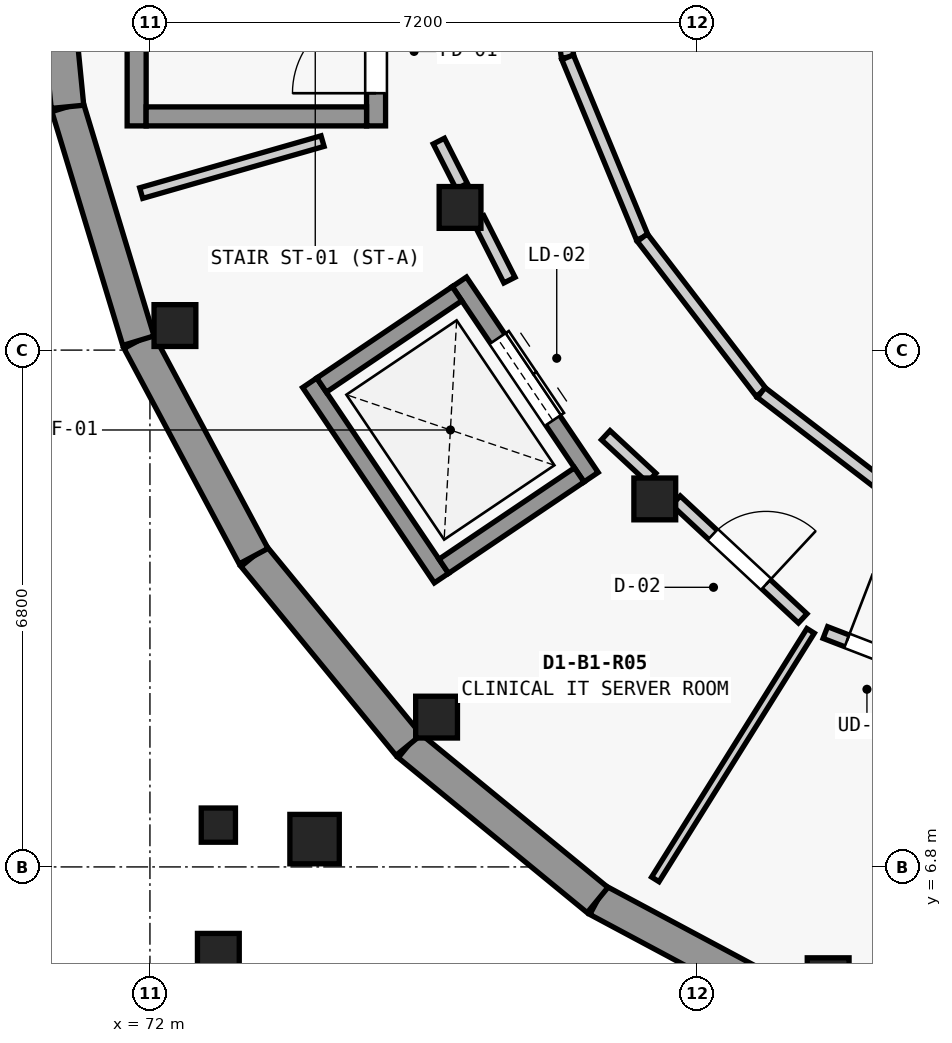
"""IFC4 building model, lengths in metres.
Left out: names, types, materials, properties, quantities, classifications, styles, units other than length and angle.
Written with IfcOpenShell. Run it as: python <this file> out.ifc"""

import sys

from ifc_helpers import new_model, si_unit, direction, frame, frame_2d, origin, origin_2d, place, context, subcontext, project, spatial, rectangle, extrude, element, fill, save


model = new_model("IFC4")
c1 = context("Model", 3, precision=1e-05, world=origin(), true_north=direction((0.0, 1.0)))
c2 = subcontext(c1, "Body", "Model", "MODEL_VIEW")
j1 = project(units=[si_unit("LENGTHUNIT", "METRE"), si_unit("PLANEANGLEUNIT", "RADIAN")], contexts=[c1])
p1 = place(None, origin())
s1 = spatial("IfcSite", under=j1, at=p1, CompositionType="ELEMENT")
p2 = place(p1, origin())
s2 = spatial("IfcBuilding", under=s1, at=p2, CompositionType="ELEMENT")
p3 = place(p2, frame((0.0, 0.0, -4.55)))
s3 = spatial("IfcBuildingStorey", under=s2, at=p3, CompositionType="ELEMENT", Elevation=-4.55)
for number, where, z_axis, x_axis in (
    (1, (72.329, 13.923, 0.0), (0.0, 0.0, 1.0), (1.0, 0.0, 0.0)),
    (2, (75.771, 8.771, 0.0), (0.0, 0.0, 1.0), (1.0, 0.0, 0.0)),
    (3, (80.923, 5.329, 0.0), (0.0, 0.0, 1.0), (1.0, 0.0, 0.0)),
    (4, (76.08, 15.477, 0.0), (0.0, 0.0, 1.0), (1.0, 0.0, 0.0)),
    (5, (78.642, 11.642, 0.0), (0.0, 0.0, 1.0), (1.0, 0.0, 0.0)),
    (6, (72.9, 5.65, 0.0), (0.0, 0.0, 1.0), (1.0, 0.0, 0.0)),
):
    element("IfcColumn", number, at=place(p3, frame(where, z_axis=z_axis, x_axis=x_axis)), inside=s3, PredefinedType="COLUMN", context=c2, shape_type="SweptSolid", body=[
        extrude(rectangle(XDim=0.55, YDim=0.55, at=origin_2d()), origin(), (0.0, 0.0, 1.0), 4.55),
    ])
p4 = place(p3, frame((74.166, 7.166, 0.0), z_axis=(0.0, 0.0, 1.0), x_axis=(1.0, 0.0, 0.0)))
e7 = element("IfcColumn", 7, at=p4, inside=s3, PredefinedType="COLUMN", context=c2, shape_type="SweptSolid", body=[
    extrude(rectangle(XDim=0.65, YDim=0.65, at=origin_2d()), origin(), (0.0, 0.0, 1.0), 4.55),
])
p5 = place(p3, frame((72.9, 7.35, 0.0), z_axis=(0.0, 0.0, 1.0), x_axis=(1.0, 0.0, 0.0)))
e8 = element("IfcColumn", 8, at=p5, inside=s3, PredefinedType="COLUMN", context=c2, shape_type="SweptSolid", body=[
    extrude(rectangle(XDim=0.45, YDim=0.45, at=origin_2d()), origin(), (0.0, 0.0, 1.0), 4.55),
])
for number, where, z_axis, x_axis in (
    (9, (80.724, 4.848, 0.0), (0.0, 0.0, 1.0), (-0.882, 0.472, 0.0)),
    (10, (77.889, 6.364, 0.0), (0.0, 0.0, 1.0), (-0.773, 0.634, 0.0)),
    (11, (75.403, 8.403, 0.0), (0.0, 0.0, 1.0), (-0.634, 0.773, 0.0)),
    (12, (73.364, 10.889, 0.0), (0.0, 0.0, 1.0), (-0.472, 0.882, 0.0)),
    (13, (71.848, 13.724, 0.0), (0.0, 0.0, 1.0), (-0.29, 0.957, 0.0)),
):
    element("IfcWall", number, at=place(p3, frame(where, z_axis=z_axis, x_axis=x_axis)), inside=s3, PredefinedType="USERDEFINED", context=c2, shape_type="SweptSolid", body=[
        extrude(rectangle(XDim=3.215, YDim=0.43, at=frame_2d((1.607, 0.0))), origin(), (0.0, 0.0, 1.0), 3.335),
    ])
p6 = place(p3, frame((70.915, 16.801, 0.0), z_axis=(0.0, 0.0, 1.0), x_axis=(-0.097977057849, 0.995188673637, 0.0)))
e14 = element("IfcWall", 14, at=p6, inside=s3, PredefinedType="USERDEFINED", context=c2, shape_type="SweptSolid", body=[
    extrude(rectangle(XDim=3.214, YDim=0.43, at=frame_2d((1.607, 0.0))), origin(), (0.0, 0.0, 1.0), 3.335),
])
p7 = place(p3, frame((74.975, 16.55, 0.0), z_axis=(0.0, 0.0, 1.0), x_axis=(0.0, 1.0, 0.0)))
e15 = element("IfcWall", 15, at=p7, inside=s3, PredefinedType="SHEAR", context=c2, shape_type="SweptSolid", body=[
    extrude(rectangle(XDim=6.9, YDim=0.25, at=frame_2d((3.45, 0.0))), origin(), (0.0, 0.0, 1.0), 4.135),
])
p8 = place(p7, frame((0.43, 0.0, 0.0)))
e16 = element("IfcOpeningElement", 16, at=p8, cuts=e15, PredefinedType="OPENING", context=c2, shape_type="SweptSolid", body=[
    extrude(rectangle(XDim=1.1, YDim=2.15, at=frame_2d((0.55, 1.075))), frame((0.0, 0.135, 0.0), z_axis=(0.0, -1.0, 0.0), x_axis=(1.0, 0.0, 0.0)), (0.0, 0.0, 1.0), 0.27),
])
p9 = place(p3, frame((71.825, 16.55, 0.0), z_axis=(0.0, 0.0, 1.0), x_axis=(0.0, 1.0, 0.0)))
e17 = element("IfcWall", 17, at=p9, inside=s3, PredefinedType="SHEAR", context=c2, shape_type="SweptSolid", body=[
    extrude(rectangle(XDim=6.9, YDim=0.25, at=frame_2d((3.45, 0.0))), origin(), (0.0, 0.0, 1.0), 4.135),
])
p10 = place(p3, frame((74.85, 16.675, 0.0), z_axis=(0.0, 0.0, 1.0), x_axis=(-1.0, 0.0, 0.0)))
e18 = element("IfcWall", 18, at=p10, inside=s3, PredefinedType="SHEAR", context=c2, shape_type="SweptSolid", body=[
    extrude(rectangle(XDim=2.9, YDim=0.25, at=frame_2d((1.45, 0.0))), origin(), (0.0, 0.0, 1.0), 4.135),
])
p11 = place(p3, frame((77.804, 11.928, 0.0), z_axis=(0.0, 0.0, 1.0), x_axis=(-0.559054792443, 0.829130712883, 0.0)))
e19 = element("IfcWall", 19, at=p11, inside=s3, PredefinedType="SHEAR", context=c2, shape_type="SweptSolid", body=[
    extrude(rectangle(XDim=3.1, YDim=0.225, at=frame_2d((1.55, 0.0))), origin(), (0.0, 0.0, 1.0), 4.135),
])
p12 = place(p11, frame((0.9, 0.0, 0.0)))
e20 = element("IfcOpeningElement", 20, at=p12, cuts=e19, PredefinedType="OPENING", context=c2, shape_type="SweptSolid", body=[
    extrude(rectangle(XDim=1.3, YDim=2.2, at=frame_2d((0.65, 1.1))), frame((0.0, 0.123, 0.0), z_axis=(0.0, -1.0, 0.0), x_axis=(1.0, 0.0, 0.0)), (0.0, 0.0, 1.0), 0.245),
])
p13 = place(p3, frame((75.835, 10.6, 0.0), z_axis=(0.0, 0.0, 1.0), x_axis=(-0.559091302934, 0.829106093925, 0.0)))
e21 = element("IfcWall", 21, at=p13, inside=s3, PredefinedType="SHEAR", context=c2, shape_type="SweptSolid", body=[
    extrude(rectangle(XDim=3.1, YDim=0.225, at=frame_2d((1.55, 0.0))), origin(), (0.0, 0.0, 1.0), 4.135),
])
p14 = place(p3, frame((77.648, 11.958, 0.0), z_axis=(0.0, 0.0, 1.0), x_axis=(-0.829050086962, -0.559174349652, 0.0)))
e22 = element("IfcWall", 22, at=p14, inside=s3, PredefinedType="SHEAR", context=c2, shape_type="SweptSolid", body=[
    extrude(rectangle(XDim=2.149, YDim=0.225, at=frame_2d((1.075, 0.0))), origin(), (0.0, 0.0, 1.0), 4.135),
])
p15 = place(p3, frame((76.04, 14.342, 0.0), z_axis=(0.0, 0.0, 1.0), x_axis=(-0.828997430928, -0.559252411274, 0.0)))
e23 = element("IfcWall", 23, at=p15, inside=s3, PredefinedType="SHEAR", context=c2, shape_type="SweptSolid", body=[
    extrude(rectangle(XDim=2.15, YDim=0.225, at=frame_2d((1.075, 0.0))), origin(), (0.0, 0.0, 1.0), 4.135),
])
p16 = place(p3, frame((77.16, 20.0, 0.0), z_axis=(0.0, 0.0, 1.0), x_axis=(0.130476636685, -0.991451384224, 0.0)))
e24 = element("IfcWall", 24, at=p16, inside=s3, PredefinedType="PARTITIONING", context=c2, shape_type="SweptSolid", body=[
    extrude(rectangle(XDim=2.569, YDim=0.165, at=frame_2d((1.285, 0.0))), origin(), (0.0, 0.0, 1.0), 2.76),
])
p17 = place(p3, frame((77.495, 17.453, 0.0), z_axis=(0.0, 0.0, 1.0), x_axis=(0.382704397106, -0.923870848353, 0.0)))
e25 = element("IfcWall", 25, at=p17, inside=s3, PredefinedType="PARTITIONING", context=c2, shape_type="SweptSolid", body=[
    extrude(rectangle(XDim=2.568, YDim=0.165, at=frame_2d((1.284, 0.0))), origin(), (0.0, 0.0, 1.0), 2.76),
])
for number, where, z_axis, x_axis in (
    (26, (78.478, 15.08, 0.0), (0.0, 0.0, 1.0), (0.609, -0.793, 0.0)),
    (27, (80.042, 13.042, 0.0), (0.0, 0.0, 1.0), (0.793, -0.609, 0.0)),
):
    element("IfcWall", number, at=place(p3, frame(where, z_axis=z_axis, x_axis=x_axis)), inside=s3, PredefinedType="PARTITIONING", context=c2, shape_type="SweptSolid", body=[
        extrude(rectangle(XDim=2.569, YDim=0.165, at=frame_2d((1.285, 0.0))), origin(), (0.0, 0.0, 1.0), 2.76),
    ])
p18 = place(p3, frame((74.271, 16.35, 0.0), z_axis=(0.0, 0.0, 1.0), x_axis=(-0.96127114667, -0.275604395065, 0.0)))
e28 = element("IfcWall", 28, at=p18, inside=s3, PredefinedType="PARTITIONING", context=c2, shape_type="SweptSolid", body=[
    extrude(rectangle(XDim=2.482, YDim=0.145, at=frame_2d((1.241, 0.0))), origin(), (0.0, 0.0, 1.0), 2.76),
])
p19 = place(p3, frame((80.692, 9.906, 0.0), z_axis=(0.0, 0.0, 1.0), x_axis=(-0.529850951132, -0.848090779094, 0.0)))
e29 = element("IfcWall", 29, at=p19, inside=s3, PredefinedType="PARTITIONING", context=c2, shape_type="SweptSolid", body=[
    extrude(rectangle(XDim=3.856, YDim=0.115, at=frame_2d((1.928, 0.0))), origin(), (0.0, 0.0, 1.0), 2.76),
])
p20 = place(p3, frame((75.801, 16.35, 0.0), z_axis=(0.0, 0.0, 1.0), x_axis=(0.453212137126, -0.891402691695, 0.0)))
e30 = element("IfcWall", 30, at=p20, inside=s3, PredefinedType="PARTITIONING", context=c2, shape_type="SweptSolid", body=[
    extrude(rectangle(XDim=0.666, YDim=0.165, at=frame_2d((0.333, 0.0))), origin(), (0.0, 0.0, 1.0), 2.76),
])
p21 = place(p3, frame((76.319, 15.331, 0.0), z_axis=(0.0, 0.0, 1.0), x_axis=(0.452366842615, -0.891831957099, 0.0)))
e31 = element("IfcWall", 31, at=p21, inside=s3, PredefinedType="PARTITIONING", context=c2, shape_type="SweptSolid", body=[
    extrude(rectangle(XDim=0.908, YDim=0.165, at=frame_2d((0.454, 0.0))), origin(), (0.0, 0.0, 1.0), 2.76),
])
p22 = place(p3, frame((77.997, 12.48, 0.0), z_axis=(0.0, 0.0, 1.0), x_axis=(0.732688002882, -0.680564684973, 0.0)))
e32 = element("IfcWall", 32, at=p22, inside=s3, PredefinedType="PARTITIONING", context=c2, shape_type="SweptSolid", body=[
    extrude(rectangle(XDim=0.824, YDim=0.165, at=frame_2d((0.412, 0.0))), origin(), (0.0, 0.0, 1.0), 2.76),
])
p23 = place(p3, frame((78.921, 11.621, 0.0), z_axis=(0.0, 0.0, 1.0), x_axis=(0.73211336643, -0.681182808572, 0.0)))
e33 = element("IfcWall", 33, at=p23, inside=s3, PredefinedType="PARTITIONING", context=c2, shape_type="SweptSolid", body=[
    extrude(rectangle(XDim=2.277, YDim=0.165, at=frame_2d((1.138, 0.0))), origin(), (0.0, 0.0, 1.0), 2.76),
])
p24 = place(p23, frame((0.659, 0.0, 0.0)))
e34 = element("IfcOpeningElement", 34, at=p24, cuts=e33, PredefinedType="OPENING", context=c2, shape_type="SweptSolid", body=[
    extrude(rectangle(XDim=0.96, YDim=2.12, at=frame_2d((0.48, 1.06))), frame((0.0, 0.093, 0.0), z_axis=(0.0, -1.0, 0.0), x_axis=(1.0, 0.0, 0.0)), (0.0, 0.0, 1.0), 0.185),
])
p25 = place(p3, frame((80.886, 9.884, 0.0), z_axis=(0.0, 0.0, 1.0), x_axis=(0.933175901825, -0.359419999796, 0.0)))
e35 = element("IfcWall", 35, at=p25, inside=s3, PredefinedType="PARTITIONING", context=c2, shape_type="SweptSolid", body=[
    extrude(rectangle(XDim=1.558, YDim=0.165, at=frame_2d((0.779, 0.0))), origin(), (0.0, 0.0, 1.0), 2.76),
])
p26 = place(p25, frame((0.304, 0.0, 0.0)))
e36 = element("IfcOpeningElement", 36, at=p26, cuts=e35, PredefinedType="OPENING", context=c2, shape_type="SweptSolid", body=[
    extrude(rectangle(XDim=0.95, YDim=2.16, at=frame_2d((0.475, 1.08))), frame((0.0, 0.093, 0.0), z_axis=(0.0, -1.0, 0.0), x_axis=(1.0, 0.0, 0.0)), (0.0, 0.0, 1.0), 0.185),
])
p27 = place(p8, origin())
e37 = element("IfcDoor", 37, at=p27, inside=s3, OperationType="SINGLE_SWING_LEFT", PredefinedType="DOOR", context=c2, shape_type="SweptSolid", body=[
    extrude(rectangle(XDim=1.1, YDim=2.15, at=frame_2d((0.55, 1.075))), frame((0.0, 0.025, 0.0), z_axis=(0.0, -1.0, 0.0), x_axis=(1.0, 0.0, 0.0)), (0.0, 0.0, 1.0), 0.05),
])
fill(e16, e37)
p28 = place(p12, origin())
e38 = element("IfcDoor", 38, at=p28, inside=s3, OperationType="DOUBLE_DOOR_SLIDING", PredefinedType="DOOR", context=c2, shape_type="SweptSolid", body=[
    extrude(rectangle(XDim=1.3, YDim=2.2, at=frame_2d((0.65, 1.1))), frame((0.0, 0.025, 0.0), z_axis=(0.0, -1.0, 0.0), x_axis=(1.0, 0.0, 0.0)), (0.0, 0.0, 1.0), 0.05),
])
fill(e20, e38)
p29 = place(p24, origin())
e39 = element("IfcDoor", 39, at=p29, inside=s3, OperationType="SINGLE_SWING_RIGHT", PredefinedType="DOOR", context=c2, shape_type="SweptSolid", body=[
    extrude(rectangle(XDim=0.96, YDim=2.12, at=frame_2d((0.48, 1.06))), frame((0.0, 0.025, 0.0), z_axis=(0.0, -1.0, 0.0), x_axis=(1.0, 0.0, 0.0)), (0.0, 0.0, 1.0), 0.05),
])
fill(e34, e39)
p30 = place(p26, origin())
e40 = element("IfcDoor", 40, at=p30, inside=s3, OperationType="SINGLE_SWING_LEFT", PredefinedType="DOOR", context=c2, shape_type="SweptSolid", body=[
    extrude(rectangle(XDim=0.95, YDim=2.16, at=frame_2d((0.475, 1.08))), frame((0.0, 0.025, 0.0), z_axis=(0.0, -1.0, 0.0), x_axis=(1.0, 0.0, 0.0)), (0.0, 0.0, 1.0), 0.05),
])
fill(e36, e40)
save(model, sys.argv[1])
